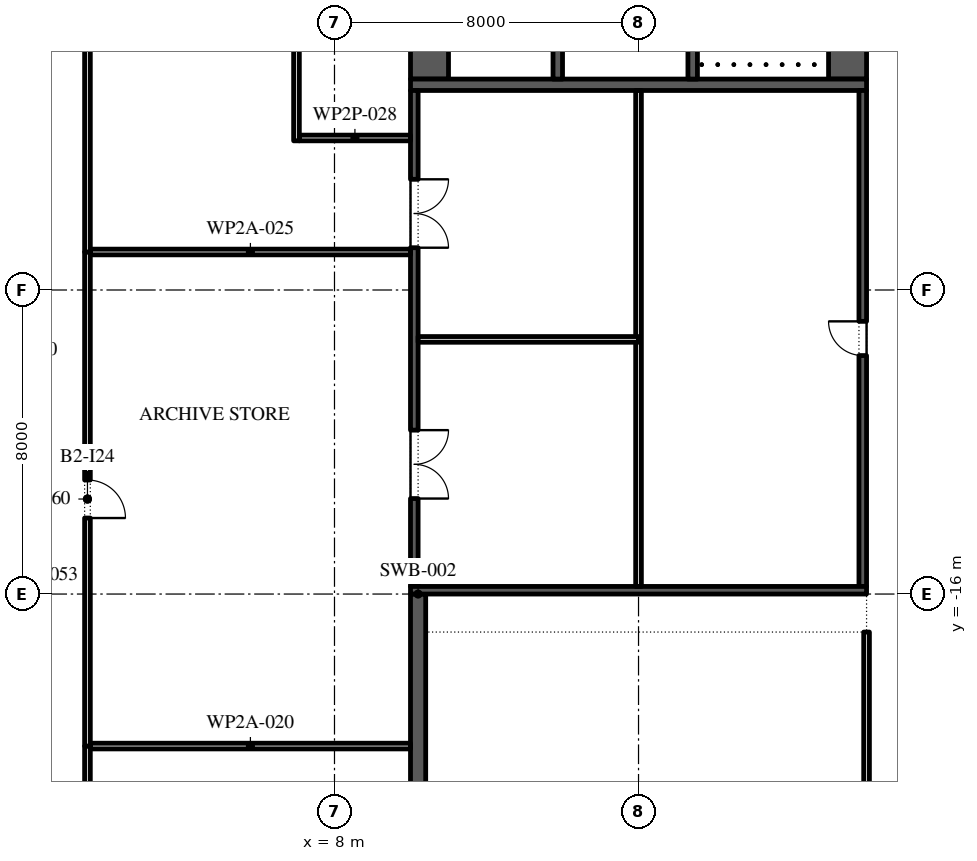
"""IFC4 building model, lengths in metres.
Left out: names, types, materials, properties, quantities, classifications, styles, units other than length and angle.
Written with IfcOpenShell. Run it as: python <this file> out.ifc"""

import sys

from ifc_helpers import new_model, si_unit, direction, frame, frame_2d, origin, place, context, subcontext, project, spatial, rectangle, extrude, element, fill, save


model = new_model("IFC4")
c1 = context("Model", 3, precision=1e-05, world=origin(), true_north=direction((0.0, 1.0)))
c2 = subcontext(c1, "Body", "Model", "MODEL_VIEW")
j1 = project(units=[si_unit("LENGTHUNIT", "METRE"), si_unit("PLANEANGLEUNIT", "RADIAN")], contexts=[c1])
p1 = place(None, origin())
s1 = spatial("IfcSite", under=j1, at=p1, CompositionType="ELEMENT")
p2 = place(p1, origin())
s2 = spatial("IfcBuilding", under=s1, at=p2, CompositionType="ELEMENT")
p3 = place(p2, frame((0.0, 0.0, -10.4)))
s3 = spatial("IfcBuildingStorey", under=s2, at=p3, CompositionType="ELEMENT", Elevation=-10.4)
p4 = place(p3, frame((10.2, -31.0, -0.3), z_axis=(0.0, 0.0, 1.0), x_axis=(0.0, 1.0, 0.0)))
e1 = element("IfcWall", 1, at=p4, inside=s3, PredefinedType="SHEAR", context=c2, shape_type="SweptSolid", body=[
    extrude(rectangle(XDim=15.0, YDim=0.4, at=frame_2d((7.5, 0.0))), origin(), (0.0, 0.0, 1.0), 5.2),
])
p5 = place(p3, frame((21.5, -2.45, 0.0), z_axis=(0.0, 0.0, 1.0), x_axis=(0.0, 1.0, 0.0)))
e2 = element("IfcWall", 2, at=p5, inside=s3, PredefinedType="SHEAR", context=c2, shape_type="SweptSolid", body=[
    extrude(rectangle(XDim=27.9, YDim=1.0, at=frame_2d((13.95, 0.0))), origin(), (0.0, 0.0, 1.0), 4.9),
])
p6 = place(p5, frame((5.05, 0.0, 0.0)))
e3 = element("IfcOpeningElement", 3, at=p6, cuts=e2, PredefinedType="OPENING", context=c2, shape_type="SweptSolid", body=[
    extrude(rectangle(XDim=1.2, YDim=2.1, at=frame_2d((0.6, 1.05))), frame((0.0, 0.51, 0.0), z_axis=(0.0, -1.0, 0.0), x_axis=(1.0, 0.0, 0.0)), (0.0, 0.0, 1.0), 1.02),
])
p7 = place(p5, frame((21.65, 0.0, 0.0)))
e4 = element("IfcOpeningElement", 4, at=p7, cuts=e2, PredefinedType="OPENING", context=c2, shape_type="SweptSolid", body=[
    extrude(rectangle(XDim=1.2, YDim=2.1, at=frame_2d((0.6, 1.05))), frame((0.0, 0.51, 0.0), z_axis=(0.0, -1.0, 0.0), x_axis=(1.0, 0.0, 0.0)), (0.0, 0.0, 1.0), 1.02),
])
p8 = place(p3, frame((10.5, -2.45, 0.0), z_axis=(0.0, 0.0, 1.0), x_axis=(0.0, 1.0, 0.0)))
e5 = element("IfcWall", 5, at=p8, inside=s3, PredefinedType="SHEAR", context=c2, shape_type="SweptSolid", body=[
    extrude(rectangle(XDim=27.9, YDim=1.0, at=frame_2d((13.95, 0.0))), origin(), (0.0, 0.0, 1.0), 4.9),
])
p9 = place(p8, frame((23.65, 0.0, 0.0)))
e6 = element("IfcOpeningElement", 6, at=p9, cuts=e5, PredefinedType="OPENING", context=c2, shape_type="SweptSolid", body=[
    extrude(rectangle(XDim=2.4, YDim=2.1, at=frame_2d((1.2, 1.05))), frame((0.0, 0.51, 0.0), z_axis=(0.0, -1.0, 0.0), x_axis=(1.0, 0.0, 0.0)), (0.0, 0.0, 1.0), 1.02),
])
p10 = place(p8, frame((1.087, 0.0, 0.0)))
e7 = element("IfcOpeningElement", 7, at=p10, cuts=e5, PredefinedType="OPENING", context=c2, shape_type="SweptSolid", body=[
    extrude(rectangle(XDim=0.9, YDim=2.1, at=frame_2d((0.45, 1.05))), frame((0.0, 0.51, 0.0), z_axis=(0.0, -1.0, 0.0), x_axis=(1.0, 0.0, 0.0)), (0.0, 0.0, 1.0), 1.02),
])
p11 = place(p8, frame((4.262, 0.0, 0.0)))
e8 = element("IfcOpeningElement", 8, at=p11, cuts=e5, PredefinedType="OPENING", context=c2, shape_type="SweptSolid", body=[
    extrude(rectangle(XDim=1.0, YDim=2.1, at=frame_2d((0.5, 1.05))), frame((0.0, 0.51, 0.0), z_axis=(0.0, -1.0, 0.0), x_axis=(1.0, 0.0, 0.0)), (0.0, 0.0, 1.0), 1.02),
])
p12 = place(p3, frame((10.0, -2.6, 0.0), z_axis=(0.0, 0.0, 1.0), x_axis=(1.0, 0.0, 0.0)))
e9 = element("IfcWall", 9, at=p12, inside=s3, PredefinedType="SHEAR", context=c2, shape_type="SweptSolid", body=[
    extrude(rectangle(XDim=12.0, YDim=0.3, at=frame_2d((6.0, 0.0))), origin(), (0.0, 0.0, 1.0), 4.9),
])
p13 = place(p3, frame((17.425, -2.45, 0.0), z_axis=(0.0, 0.0, 1.0), x_axis=(0.0, 1.0, 0.0)))
e10 = element("IfcWall", 10, at=p13, inside=s3, PredefinedType="SHEAR", context=c2, shape_type="SweptSolid", body=[
    extrude(rectangle(XDim=6.3, YDim=0.25, at=frame_2d((3.15, 0.0))), origin(), (0.0, 0.0, 1.0), 4.9),
])
p14 = place(p13, frame((5.05, 0.0, 0.0)))
e11 = element("IfcOpeningElement", 11, at=p14, cuts=e10, PredefinedType="OPENING", context=c2, shape_type="SweptSolid", body=[
    extrude(rectangle(XDim=1.2, YDim=2.1, at=frame_2d((0.6, 1.05))), frame((0.0, 0.135, 0.0), z_axis=(0.0, -1.0, 0.0), x_axis=(1.0, 0.0, 0.0)), (0.0, 0.0, 1.0), 0.27),
])
p15 = place(p3, frame((13.875, -2.45, 0.0), z_axis=(0.0, 0.0, 1.0), x_axis=(0.0, 1.0, 0.0)))
e12 = element("IfcWall", 12, at=p15, inside=s3, PredefinedType="SHEAR", context=c2, shape_type="SweptSolid", body=[
    extrude(rectangle(XDim=21.3, YDim=0.25, at=frame_2d((10.65, 0.0))), origin(), (0.0, 0.0, 1.0), 4.9),
])
p16 = place(p15, frame((14.121, 0.0, 0.0)))
e13 = element("IfcOpeningElement", 13, at=p16, cuts=e12, PredefinedType="OPENING", context=c2, shape_type="SweptSolid", body=[
    extrude(rectangle(XDim=1.8, YDim=2.4, at=frame_2d((0.9, 1.2))), frame((0.0, 0.135, 0.0), z_axis=(0.0, -1.0, 0.0), x_axis=(1.0, 0.0, 0.0)), (0.0, 0.0, 1.0), 0.27),
])
p17 = place(p15, frame((6.971, 0.0, 0.0)))
e14 = element("IfcOpeningElement", 14, at=p17, cuts=e12, PredefinedType="OPENING", context=c2, shape_type="SweptSolid", body=[
    extrude(rectangle(XDim=1.1, YDim=2.1, at=frame_2d((0.55, 1.05))), frame((0.0, 0.135, 0.0), z_axis=(0.0, -1.0, 0.0), x_axis=(1.0, 0.0, 0.0)), (0.0, 0.0, 1.0), 0.27),
])
p18 = place(p3, frame((21.9, -15.8, 0.0), z_axis=(0.0, 0.0, 1.0), x_axis=(0.0, 1.0, 0.0)))
e15 = element("IfcWall", 15, at=p18, inside=s3, PredefinedType="SHEAR", context=c2, shape_type="SweptSolid", body=[
    extrude(rectangle(XDim=13.05, YDim=0.2, at=frame_2d((6.525, 0.0))), origin(), (0.0, 0.0, 1.0), 4.9),
])
p19 = place(p18, frame((6.075, 0.0, 0.0)))
e16 = element("IfcOpeningElement", 16, at=p19, cuts=e15, PredefinedType="OPENING", context=c2, shape_type="SweptSolid", body=[
    extrude(rectangle(XDim=0.9, YDim=2.1, at=frame_2d((0.45, 1.05))), frame((0.0, 0.11, 0.0), z_axis=(0.0, -1.0, 0.0), x_axis=(1.0, 0.0, 0.0)), (0.0, 0.0, 1.0), 0.22),
])
p20 = place(p3, frame((10.1, -15.8, 0.0), z_axis=(0.0, 0.0, 1.0), x_axis=(0.0, 1.0, 0.0)))
e17 = element("IfcWall", 17, at=p20, inside=s3, PredefinedType="SHEAR", context=c2, shape_type="SweptSolid", body=[
    extrude(rectangle(XDim=13.05, YDim=0.2, at=frame_2d((6.525, 0.0))), origin(), (0.0, 0.0, 1.0), 4.9),
])
p21 = place(p20, frame((2.312, 0.0, 0.0)))
e18 = element("IfcOpeningElement", 18, at=p21, cuts=e17, PredefinedType="OPENING", context=c2, shape_type="SweptSolid", body=[
    extrude(rectangle(XDim=1.8, YDim=2.4, at=frame_2d((0.9, 1.2))), frame((0.0, 0.11, 0.0), z_axis=(0.0, -1.0, 0.0), x_axis=(1.0, 0.0, 0.0)), (0.0, 0.0, 1.0), 0.22),
])
p22 = place(p20, frame((8.913, 0.0, 0.0)))
e19 = element("IfcOpeningElement", 19, at=p22, cuts=e17, PredefinedType="OPENING", context=c2, shape_type="SweptSolid", body=[
    extrude(rectangle(XDim=1.8, YDim=2.4, at=frame_2d((0.9, 1.2))), frame((0.0, 0.11, 0.0), z_axis=(0.0, -1.0, 0.0), x_axis=(1.0, 0.0, 0.0)), (0.0, 0.0, 1.0), 0.22),
])
p23 = place(p3, frame((10.0, -15.9, 0.0), z_axis=(0.0, 0.0, 1.0), x_axis=(1.0, 0.0, 0.0)))
e20 = element("IfcWall", 20, at=p23, inside=s3, PredefinedType="SHEAR", context=c2, shape_type="SweptSolid", body=[
    extrude(rectangle(XDim=12.0, YDim=0.2, at=frame_2d((6.0, 0.0))), origin(), (0.0, 0.0, 1.0), 4.9),
])
p24 = place(p3, frame((16.0, -15.8, 0.0), z_axis=(0.0, 0.0, 1.0), x_axis=(0.0, 1.0, 0.0)))
e21 = element("IfcWall", 21, at=p24, inside=s3, PredefinedType="PARTITIONING", context=c2, shape_type="SweptSolid", body=[
    extrude(rectangle(XDim=13.05, YDim=0.15, at=frame_2d((6.525, 0.0))), origin(), (0.0, 0.0, 1.0), 4.9),
])
p25 = place(p3, frame((10.2, -9.3, 0.0), z_axis=(0.0, 0.0, 1.0), x_axis=(1.0, 0.0, 0.0)))
e22 = element("IfcWall", 22, at=p25, inside=s3, PredefinedType="PARTITIONING", context=c2, shape_type="SweptSolid", body=[
    extrude(rectangle(XDim=5.8, YDim=0.15, at=frame_2d((2.9, 0.0))), origin(), (0.0, 0.0, 1.0), 4.9),
])
for number, where, z_axis, x_axis in (
    (23, (1.575, -20.0, 0.0), (0.0, 0.0, 1.0), (1.0, 0.0, 0.0)),
    (24, (1.575, -7.0, 0.0), (0.0, 0.0, 1.0), (1.0, 0.0, 0.0)),
):
    element("IfcWall", number, at=place(p3, frame(where, z_axis=z_axis, x_axis=x_axis)), inside=s3, PredefinedType="PARTITIONING", context=c2, shape_type="SweptSolid", body=[
        extrude(rectangle(XDim=8.425, YDim=0.15, at=frame_2d((4.212, 0.0))), origin(), (0.0, 0.0, 1.0), 4.9),
    ])
p26 = place(p3, frame((7.075, -4.0, 0.0), z_axis=(0.0, 0.0, 1.0), x_axis=(1.0, 0.0, 0.0)))
e25 = element("IfcWall", 25, at=p26, inside=s3, PredefinedType="PARTITIONING", context=c2, shape_type="SweptSolid", body=[
    extrude(rectangle(XDim=2.925, YDim=0.15, at=frame_2d((1.462, 0.0))), origin(), (0.0, 0.0, 1.0), 3.93),
])
p27 = place(p3, frame((1.5, -31.075, 0.0), z_axis=(0.0, 0.0, 1.0), x_axis=(0.0, 1.0, 0.0)))
e26 = element("IfcWall", 26, at=p27, inside=s3, PredefinedType="PARTITIONING", context=c2, shape_type="SweptSolid", body=[
    extrude(rectangle(XDim=11.075, YDim=0.15, at=frame_2d((5.538, 0.0))), origin(), (0.0, 0.0, 1.0), 4.9),
])
p28 = place(p27, frame((5.038, 0.0, 0.0)))
e27 = element("IfcOpeningElement", 27, at=p28, cuts=e26, PredefinedType="OPENING", context=c2, shape_type="SweptSolid", body=[
    extrude(rectangle(XDim=1.0, YDim=2.1, at=frame_2d((0.5, 1.05))), frame((0.0, 0.085, 0.0), z_axis=(0.0, -1.0, 0.0), x_axis=(1.0, 0.0, 0.0)), (0.0, 0.0, 1.0), 0.17),
])
p29 = place(p3, frame((1.5, -20.0, 0.0), z_axis=(0.0, 0.0, 1.0), x_axis=(0.0, 1.0, 0.0)))
e28 = element("IfcWall", 28, at=p29, inside=s3, PredefinedType="PARTITIONING", context=c2, shape_type="SweptSolid", body=[
    extrude(rectangle(XDim=13.0, YDim=0.15, at=frame_2d((6.5, 0.0))), origin(), (0.0, 0.0, 1.0), 4.9),
])
p30 = place(p29, frame((6.0, 0.0, 0.0)))
e29 = element("IfcOpeningElement", 29, at=p30, cuts=e28, PredefinedType="OPENING", context=c2, shape_type="SweptSolid", body=[
    extrude(rectangle(XDim=1.0, YDim=2.1, at=frame_2d((0.5, 1.05))), frame((0.0, 0.085, 0.0), z_axis=(0.0, -1.0, 0.0), x_axis=(1.0, 0.0, 0.0)), (0.0, 0.0, 1.0), 0.17),
])
p31 = place(p3, frame((1.5, -7.0, 0.0), z_axis=(0.0, 0.0, 1.0), x_axis=(0.0, 1.0, 0.0)))
e30 = element("IfcWall", 30, at=p31, inside=s3, PredefinedType="PARTITIONING", context=c2, shape_type="SweptSolid", body=[
    extrude(rectangle(XDim=32.475, YDim=0.15, at=frame_2d((16.238, 0.0))), origin(), (0.0, 0.0, 1.0), 4.9),
])
p32 = place(p3, frame((7.0, -4.075, 0.0), z_axis=(0.0, 0.0, 1.0), x_axis=(0.0, 1.0, 0.0)))
e31 = element("IfcWall", 31, at=p32, inside=s3, PredefinedType="PARTITIONING", context=c2, shape_type="SweptSolid", body=[
    extrude(rectangle(XDim=29.55, YDim=0.15, at=frame_2d((14.775, 0.0))), origin(), (0.0, 0.0, 1.0), 4.9),
])
p33 = place(p32, frame((13.875, 0.0, 0.0)))
e32 = element("IfcOpeningElement", 32, at=p33, cuts=e31, PredefinedType="OPENING", context=c2, shape_type="SweptSolid", body=[
    extrude(rectangle(XDim=1.8, YDim=2.1, at=frame_2d((0.9, 1.05))), frame((0.0, 0.085, 0.0), z_axis=(0.0, -1.0, 0.0), x_axis=(1.0, 0.0, 0.0)), (0.0, 0.0, 1.0), 0.17),
])
p34 = place(p3, frame((22.0, -31.075, 0.0), z_axis=(0.0, 0.0, 1.0), x_axis=(0.0, 1.0, 0.0)))
e33 = element("IfcWall", 33, at=p34, inside=s3, PredefinedType="PARTITIONING", context=c2, shape_type="SweptSolid", body=[
    extrude(rectangle(XDim=14.075, YDim=0.15, at=frame_2d((7.038, 0.0))), origin(), (0.0, 0.0, 1.0), 4.9),
])
p35 = place(p34, frame((6.137, 0.0, 0.0)))
e34 = element("IfcOpeningElement", 34, at=p35, cuts=e33, PredefinedType="OPENING", context=c2, shape_type="SweptSolid", body=[
    extrude(rectangle(XDim=1.8, YDim=2.1, at=frame_2d((0.9, 1.05))), frame((0.0, 0.085, 0.0), z_axis=(0.0, -1.0, 0.0), x_axis=(1.0, 0.0, 0.0)), (0.0, 0.0, 1.0), 0.17),
])
p36 = place(p19, origin())
e35 = element("IfcDoor", 35, at=p36, inside=s3, OperationType="SINGLE_SWING_LEFT", PredefinedType="DOOR", context=c2, shape_type="SweptSolid", body=[
    extrude(rectangle(XDim=0.9, YDim=2.1, at=frame_2d((0.45, 1.05))), frame((0.0, 0.1, 0.0), z_axis=(0.0, -1.0, 0.0), x_axis=(1.0, 0.0, 0.0)), (0.0, 0.0, 1.0), 0.05),
])
fill(e16, e35)
p37 = place(p21, frame((1.8, -0.15, 0.0), z_axis=(0.0, 0.0, 1.0), x_axis=(-1.0, 0.0, 0.0)))
e36 = element("IfcDoor", 36, at=p37, inside=s3, OperationType="DOUBLE_DOOR_SINGLE_SWING", PredefinedType="DOOR", context=c2, shape_type="SweptSolid", body=[
    extrude(rectangle(XDim=1.8, YDim=2.4, at=frame_2d((0.9, 1.2))), frame((0.0, -0.05, 0.0), z_axis=(0.0, -1.0, 0.0), x_axis=(1.0, 0.0, 0.0)), (0.0, 0.0, 1.0), 0.05),
])
fill(e18, e36)
p38 = place(p22, frame((1.8, -0.15, 0.0), z_axis=(0.0, 0.0, 1.0), x_axis=(-1.0, 0.0, 0.0)))
e37 = element("IfcDoor", 37, at=p38, inside=s3, OperationType="DOUBLE_DOOR_SINGLE_SWING", PredefinedType="DOOR", context=c2, shape_type="SweptSolid", body=[
    extrude(rectangle(XDim=1.8, YDim=2.4, at=frame_2d((0.9, 1.2))), frame((0.0, -0.05, 0.0), z_axis=(0.0, -1.0, 0.0), x_axis=(1.0, 0.0, 0.0)), (0.0, 0.0, 1.0), 0.05),
])
fill(e19, e37)
p39 = place(p30, frame((1.0, 0.0, 0.0), z_axis=(0.0, 0.0, 1.0), x_axis=(-1.0, 0.0, 0.0)))
e38 = element("IfcDoor", 38, at=p39, inside=s3, OperationType="SINGLE_SWING_LEFT", PredefinedType="DOOR", context=c2, shape_type="SweptSolid", body=[
    extrude(rectangle(XDim=1.0, YDim=2.1, at=frame_2d((0.5, 1.05))), frame((0.0, 0.025, 0.0), z_axis=(0.0, -1.0, 0.0), x_axis=(1.0, 0.0, 0.0)), (0.0, 0.0, 1.0), 0.05),
])
fill(e29, e38)
save(model, sys.argv[1])
